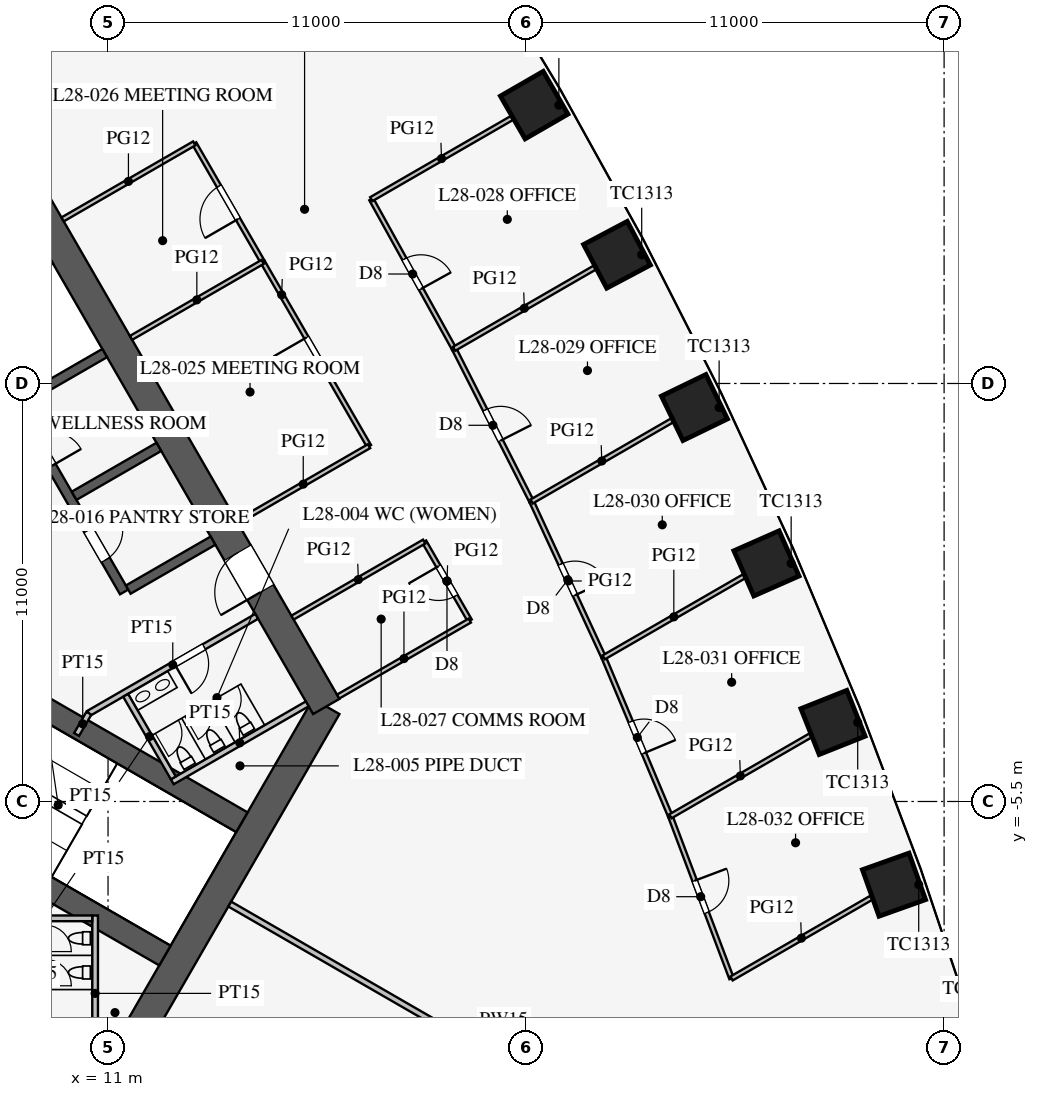
"""IFC4 building model, lengths in metres.
Left out: names, types, materials, properties, quantities, classifications, styles, units other than length and angle.
Written with IfcOpenShell. Run it as: python <this file> out.ifc"""

import sys

from ifc_helpers import new_model, si_unit, direction, frame, frame_2d, origin, origin_2d, place, context, subcontext, project, spatial, rectangle, extrude, element, fill, save


model = new_model("IFC4")
c1 = context("Model", 3, precision=1e-05, world=origin(), true_north=direction((0.0, 1.0)))
c2 = subcontext(c1, "Body", "Model", "MODEL_VIEW")
j1 = project(units=[si_unit("LENGTHUNIT", "METRE"), si_unit("PLANEANGLEUNIT", "RADIAN")], contexts=[c1])
p1 = place(None, origin())
s1 = spatial("IfcSite", under=j1, at=p1, CompositionType="ELEMENT")
p2 = place(p1, origin())
s2 = spatial("IfcBuilding", under=s1, at=p2, CompositionType="ELEMENT")
p3 = place(p2, frame((0.0, 0.0, 124.1)))
s3 = spatial("IfcBuildingStorey", under=s2, at=p3, CompositionType="ELEMENT", Elevation=124.1)
for number, where, z_axis, x_axis in (
    (1, (31.682, -7.689, 0.0), (0.0, 0.0, 1.0), (-0.336, 0.942, 0.0)),
    (2, (30.077, -3.42, 0.0), (0.0, 0.0, 1.0), (-0.37, 0.929, 0.0)),
    (3, (28.325, 0.765, 0.0), (0.0, 0.0, 1.0), (-0.403, 0.915, 0.0)),
    (4, (26.43, 4.867, 0.0), (0.0, 0.0, 1.0), (-0.436, 0.9, 0.0)),
    (5, (24.393, 8.887, 0.0), (0.0, 0.0, 1.0), (-0.468, 0.883, 0.0)),
    (6, (22.213, 12.825, 0.0), (0.0, 0.0, 1.0), (-0.5, 0.866, 0.0)),
):
    element("IfcColumn", number, at=place(p3, frame(where, z_axis=z_axis, x_axis=x_axis)), inside=s3, PredefinedType="COLUMN", context=c2, shape_type="SweptSolid", body=[
        extrude(rectangle(XDim=1.3, YDim=1.3, at=origin_2d()), origin(), (0.0, 0.0, 1.0), 4.2),
    ])
p4 = place(p3, frame((10.97, -13.0, 0.0), z_axis=(0.0, 0.0, 1.0), x_axis=(0.499995765644, 0.866027848477, 0.0)))
e7 = element("IfcWall", 7, at=p4, inside=s3, PredefinedType="SHEAR", context=c2, shape_type="SweptSolid", body=[
    extrude(rectangle(XDim=11.547, YDim=0.8, at=frame_2d((5.773, 0.0))), origin(), (0.0, 0.0, 1.0), 4.2),
])
p5 = place(p3, frame((16.743, -3.0, 0.0), z_axis=(0.0, 0.0, 1.0), x_axis=(-0.500002442456, 0.866023993627, 0.0)))
e8 = element("IfcWall", 8, at=p5, inside=s3, PredefinedType="SHEAR", context=c2, shape_type="SweptSolid", body=[
    extrude(rectangle(XDim=21.939, YDim=0.8, at=frame_2d((10.97, 0.0))), origin(), (0.0, 0.0, 1.0), 4.2),
])
p6 = place(p5, frame((17.27, 0.0, 0.0)))
e9 = element("IfcOpeningElement", 9, at=p6, cuts=e8, PredefinedType="OPENING", context=c2, shape_type="SweptSolid", body=[
    extrude(rectangle(XDim=1.2, YDim=2.1, at=frame_2d((0.6, 1.05))), frame((0.0, 0.41, 0.0), z_axis=(0.0, -1.0, 0.0), x_axis=(1.0, 0.0, 0.0)), (0.0, 0.0, 1.0), 0.82),
])
p7 = place(p5, frame((3.47, 0.0, 0.0)))
e10 = element("IfcOpeningElement", 10, at=p7, cuts=e8, PredefinedType="OPENING", context=c2, shape_type="SweptSolid", body=[
    extrude(rectangle(XDim=1.2, YDim=2.1, at=frame_2d((0.6, 1.05))), frame((0.0, 0.41, 0.0), z_axis=(0.0, -1.0, 0.0), x_axis=(1.0, 0.0, 0.0)), (0.0, 0.0, 1.0), 0.82),
])
p8 = place(p3, frame((11.424, 0.014, 0.0), z_axis=(0.0, 0.0, 1.0), x_axis=(-0.500001763848, 0.866024385424, 0.0)))
e11 = element("IfcWall", 11, at=p8, inside=s3, PredefinedType="SHEAR", context=c2, shape_type="SweptSolid", body=[
    extrude(rectangle(XDim=11.4, YDim=0.25, at=frame_2d((5.7, 0.0))), origin(), (0.0, 0.0, 1.0), 4.2),
])
p9 = place(p8, frame((0.975, 0.0, 0.0)))
e12 = element("IfcOpeningElement", 12, at=p9, cuts=e11, PredefinedType="OPENING", context=c2, shape_type="SweptSolid", body=[
    extrude(rectangle(XDim=0.9, YDim=2.1, at=frame_2d((0.45, 1.05))), frame((0.0, 0.135, 0.0), z_axis=(0.0, -1.0, 0.0), x_axis=(1.0, 0.0, 0.0)), (0.0, 0.0, 1.0), 0.27),
])
p10 = place(p8, frame((3.825, 0.0, 0.0)))
e13 = element("IfcOpeningElement", 13, at=p10, cuts=e11, PredefinedType="OPENING", context=c2, shape_type="SweptSolid", body=[
    extrude(rectangle(XDim=0.9, YDim=2.1, at=frame_2d((0.45, 1.05))), frame((0.0, 0.135, 0.0), z_axis=(0.0, -1.0, 0.0), x_axis=(1.0, 0.0, 0.0)), (0.0, 0.0, 1.0), 0.27),
])
for number, where, z_axis, x_axis in (
    (14, (11.532, 0.076, 0.0), (0.0, 0.0, 1.0), (0.866, 0.5, 0.0)),
    (15, (10.107, 2.544, 0.0), (0.0, 0.0, 1.0), (0.866, 0.5, 0.0)),
    (16, (8.682, 5.012, 0.0), (0.0, 0.0, 1.0), (0.866, 0.5, 0.0)),
    (17, (7.257, 7.481, 0.0), (0.0, 0.0, 1.0), (0.866, 0.5, 0.0)),
):
    element("IfcWall", number, at=place(p3, frame(where, z_axis=z_axis, x_axis=x_axis)), inside=s3, PredefinedType="SHEAR", context=c2, shape_type="SweptSolid", body=[
        extrude(rectangle(XDim=2.575, YDim=0.25, at=frame_2d((1.288, 0.0))), origin(), (0.0, 0.0, 1.0), 4.2),
    ])
for number, where, z_axis, x_axis in (
    (18, (4.638, -5.016, 0.0), (0.0, 0.0, 1.0), (0.866, -0.5, 0.0)),
    (19, (6.663, -1.509, 0.0), (0.0, 0.0, 1.0), (0.866, -0.5, 0.0)),
):
    element("IfcWall", number, at=place(p3, frame(where, z_axis=z_axis, x_axis=x_axis)), inside=s3, PredefinedType="SHEAR", context=c2, shape_type="SweptSolid", body=[
        extrude(rectangle(XDim=9.075, YDim=0.6, at=frame_2d((4.538, 0.0))), origin(), (0.0, 0.0, 1.0), 4.2),
    ])
p11 = place(p3, frame((10.495, -3.178, 0.0), z_axis=(0.0, 0.0, 1.0), x_axis=(0.86602216432, 0.500005610874, 0.0)))
e20 = element("IfcWall", 20, at=p11, inside=s3, PredefinedType="PARTITIONING", context=c2, shape_type="SweptSolid", body=[
    extrude(rectangle(XDim=5.1, YDim=0.15, at=frame_2d((2.55, 0.0))), origin(), (0.0, 0.0, 1.0), 4.0),
])
p12 = place(p11, frame((2.6, 0.0, 0.0)))
e21 = element("IfcOpeningElement", 21, at=p12, cuts=e20, PredefinedType="OPENING", context=c2, shape_type="SweptSolid", body=[
    extrude(rectangle(XDim=0.9, YDim=2.1, at=frame_2d((0.45, 1.05))), frame((0.0, 0.085, 0.0), z_axis=(0.0, -1.0, 0.0), x_axis=(1.0, 0.0, 0.0)), (0.0, 0.0, 1.0), 0.17),
])
p13 = place(p3, frame((10.495, -3.178, 0.0), z_axis=(0.0, 0.0, 1.0), x_axis=(-0.499842556608, -0.866116284689, 0.0)))
e22 = element("IfcWall", 22, at=p13, inside=s3, PredefinedType="PARTITIONING", context=c2, shape_type="SweptSolid", body=[
    extrude(rectangle(XDim=0.645, YDim=0.15, at=frame_2d((0.323, 0.0))), origin(), (0.0, 0.0, 1.0), 4.0),
])
p14 = place(p3, frame((10.66, -8.5, 0.0), z_axis=(0.0, 0.0, 1.0), x_axis=(0.0, -1.0, 0.0)))
e23 = element("IfcWall", 23, at=p14, inside=s3, PredefinedType="PARTITIONING", context=c2, shape_type="SweptSolid", body=[
    extrude(rectangle(XDim=4.1, YDim=0.15, at=frame_2d((2.05, 0.0))), origin(), (0.0, 0.0, 1.0), 4.0),
])
p15 = place(p3, frame((8.075, -8.575, 0.0), z_axis=(0.0, 0.0, 1.0), x_axis=(1.0, 0.0, 0.0)))
e24 = element("IfcWall", 24, at=p15, inside=s3, PredefinedType="PARTITIONING", context=c2, shape_type="SweptSolid", body=[
    extrude(rectangle(XDim=2.51, YDim=0.15, at=frame_2d((1.255, 0.0))), origin(), (0.0, 0.0, 1.0), 4.0),
])
p16 = place(p3, frame((12.691, -4.982, 0.0), z_axis=(0.0, 0.0, 1.0), x_axis=(0.8660249478, 0.500000789788, 0.0)))
e25 = element("IfcWall", 25, at=p16, inside=s3, PredefinedType="PARTITIONING", context=c2, shape_type="SweptSolid", body=[
    extrude(rectangle(XDim=4.1, YDim=0.15, at=frame_2d((2.05, 0.0))), origin(), (0.0, 0.0, 1.0), 4.0),
])
p17 = place(p3, frame((11.464, -2.706, 0.0), z_axis=(0.0, 0.0, 1.0), x_axis=(0.50001992892, -0.866013897511, 0.0)))
e26 = element("IfcWall", 26, at=p17, inside=s3, PredefinedType="PARTITIONING", context=c2, shape_type="SweptSolid", body=[
    extrude(rectangle(XDim=2.51, YDim=0.15, at=frame_2d((1.255, 0.0))), origin(), (0.0, 0.0, 1.0), 4.0),
])
p18 = place(p3, frame((14.203, -8.2, 0.0), z_axis=(0.0, 0.0, 1.0), x_axis=(0.866024668836, -0.500001272966, 0.0)))
e27 = element("IfcWall", 27, at=p18, inside=s3, PredefinedType="PARTITIONING", context=c2, shape_type="SweptSolid", body=[
    extrude(rectangle(XDim=16.65, YDim=0.15, at=frame_2d((8.325, 0.0))), origin(), (0.0, 0.0, 1.0), 2.3),
])
p19 = place(p3, frame((15.069, 8.7, 0.0), z_axis=(0.0, 0.0, 1.0), x_axis=(-0.500012057535, 0.866018442252, 0.0)))
e28 = element("IfcWall", 28, at=p19, inside=s3, PredefinedType="PARTITIONING", context=c2, shape_type="SweptSolid", body=[
    extrude(rectangle(XDim=3.6, YDim=0.12, at=frame_2d((1.8, 0.0))), origin(), (0.0, 0.0, 1.0), 2.9),
])
p20 = place(p19, frame((1.3, 0.0, 0.15)))
e29 = element("IfcOpeningElement", 29, at=p20, cuts=e28, PredefinedType="OPENING", context=c2, shape_type="SweptSolid", body=[
    extrude(rectangle(XDim=1.0, YDim=2.1, at=frame_2d((0.5, 1.05))), frame((0.0, 0.07, 0.0), z_axis=(0.0, -1.0, 0.0), x_axis=(1.0, 0.0, 0.0)), (0.0, 0.0, 1.0), 0.14),
])
p21 = place(p3, frame((20.519, -0.74, 0.0), z_axis=(0.0, 0.0, 1.0), x_axis=(-0.499957262057, 0.866050077142, 0.0)))
e30 = element("IfcWall", 30, at=p21, inside=s3, PredefinedType="PARTITIONING", context=c2, shape_type="SweptSolid", body=[
    extrude(rectangle(XDim=2.4, YDim=0.12, at=frame_2d((1.2, 0.0))), origin(), (0.0, 0.0, 1.0), 2.9),
])
p22 = place(p21, frame((0.75, 0.0, 0.15)))
e31 = element("IfcOpeningElement", 31, at=p22, cuts=e30, PredefinedType="OPENING", context=c2, shape_type="SweptSolid", body=[
    extrude(rectangle(XDim=0.9, YDim=2.1, at=frame_2d((0.45, 1.05))), frame((0.0, 0.07, 0.0), z_axis=(0.0, -1.0, 0.0), x_axis=(1.0, 0.0, 0.0)), (0.0, 0.0, 1.0), 0.14),
])
p23 = place(p3, frame((17.869, 3.85, 0.0), z_axis=(0.0, 0.0, 1.0), x_axis=(-0.500016814911, 0.866015695474, 0.0)))
e32 = element("IfcWall", 32, at=p23, inside=s3, PredefinedType="PARTITIONING", context=c2, shape_type="SweptSolid", body=[
    extrude(rectangle(XDim=5.6, YDim=0.12, at=frame_2d((2.8, 0.0))), origin(), (0.0, 0.0, 1.0), 2.9),
])
p24 = place(p23, frame((2.3, 0.0, 0.15)))
e33 = element("IfcOpeningElement", 33, at=p24, cuts=e32, PredefinedType="OPENING", context=c2, shape_type="SweptSolid", body=[
    extrude(rectangle(XDim=1.0, YDim=2.1, at=frame_2d((0.5, 1.05))), frame((0.0, 0.07, 0.0), z_axis=(0.0, -1.0, 0.0), x_axis=(1.0, 0.0, 0.0)), (0.0, 0.0, 1.0), 0.14),
])
for number, where, z_axis, x_axis in (
    (34, (9.805, 9.818, 0.0), (0.0, 0.0, 1.0), (0.866, 0.5, 0.0)),
    (35, (11.605, 6.7, 0.0), (0.0, 0.0, 1.0), (0.866, 0.5, 0.0)),
    (36, (17.055, -2.74, 0.0), (0.0, 0.0, 1.0), (0.866, 0.5, 0.0)),
    (37, (14.405, 1.85, 0.0), (0.0, 0.0, 1.0), (0.866, 0.5, 0.0)),
    (38, (15.855, -0.661, 0.0), (0.0, 0.0, 1.0), (0.866, 0.5, 0.0)),
):
    element("IfcWall", number, at=place(p3, frame(where, z_axis=z_axis, x_axis=x_axis)), inside=s3, PredefinedType="PARTITIONING", context=c2, shape_type="SweptSolid", body=[
        extrude(rectangle(XDim=4.0, YDim=0.12, at=frame_2d((2.0, 0.0))), origin(), (0.0, 0.0, 1.0), 2.9),
    ])
p25 = place(p3, frame((24.043, -1.708, 0.0), z_axis=(0.0, 0.0, 1.0), x_axis=(-0.41992827805, 0.90755729367, 0.0)))
e39 = element("IfcWall", 39, at=p25, inside=s3, PredefinedType="PARTITIONING", context=c2, shape_type="SweptSolid", body=[
    extrude(rectangle(XDim=4.519, YDim=0.12, at=frame_2d((2.259, 0.0))), origin(), (0.0, 0.0, 1.0), 2.9),
])
p26 = place(p25, frame((1.8, 0.0, 0.15)))
e40 = element("IfcOpeningElement", 40, at=p26, cuts=e39, PredefinedType="OPENING", context=c2, shape_type="SweptSolid", body=[
    extrude(rectangle(XDim=0.9, YDim=2.1, at=frame_2d((0.45, 1.05))), frame((0.0, 0.07, 0.0), z_axis=(0.0, -1.0, 0.0), x_axis=(1.0, 0.0, 0.0)), (0.0, 0.0, 1.0), 0.14),
])
p27 = place(p3, frame((25.797, -5.891, 0.0), z_axis=(0.0, 0.0, 1.0), x_axis=(-0.386762112496, 0.922179520667, 0.0)))
e41 = element("IfcWall", 41, at=p27, inside=s3, PredefinedType="PARTITIONING", context=c2, shape_type="SweptSolid", body=[
    extrude(rectangle(XDim=4.536, YDim=0.12, at=frame_2d((2.268, 0.0))), origin(), (0.0, 0.0, 1.0), 2.9),
])
p28 = place(p27, frame((1.8, 0.0, 0.15)))
e42 = element("IfcOpeningElement", 42, at=p28, cuts=e41, PredefinedType="OPENING", context=c2, shape_type="SweptSolid", body=[
    extrude(rectangle(XDim=0.9, YDim=2.1, at=frame_2d((0.45, 1.05))), frame((0.0, 0.07, 0.0), z_axis=(0.0, -1.0, 0.0), x_axis=(1.0, 0.0, 0.0)), (0.0, 0.0, 1.0), 0.14),
])
p29 = place(p3, frame((27.406, -10.158, 0.0), z_axis=(0.0, 0.0, 1.0), x_axis=(-0.352894560512, 0.93566309597, 0.0)))
e43 = element("IfcWall", 43, at=p29, inside=s3, PredefinedType="PARTITIONING", context=c2, shape_type="SweptSolid", body=[
    extrude(rectangle(XDim=4.561, YDim=0.12, at=frame_2d((2.28, 0.0))), origin(), (0.0, 0.0, 1.0), 2.9),
])
p30 = place(p29, frame((1.85, 0.0, 0.15)))
e44 = element("IfcOpeningElement", 44, at=p30, cuts=e43, PredefinedType="OPENING", context=c2, shape_type="SweptSolid", body=[
    extrude(rectangle(XDim=0.9, YDim=2.1, at=frame_2d((0.45, 1.05))), frame((0.0, 0.07, 0.0), z_axis=(0.0, -1.0, 0.0), x_axis=(1.0, 0.0, 0.0)), (0.0, 0.0, 1.0), 0.14),
])
p31 = place(p3, frame((20.106, 6.412, 0.0), z_axis=(0.0, 0.0, 1.0), x_axis=(-0.484292898211, 0.874905931368, 0.0)))
e45 = element("IfcWall", 45, at=p31, inside=s3, PredefinedType="PARTITIONING", context=c2, shape_type="SweptSolid", body=[
    extrude(rectangle(XDim=4.501, YDim=0.12, at=frame_2d((2.25, 0.0))), origin(), (0.0, 0.0, 1.0), 2.9),
])
p32 = place(p31, frame((1.8, 0.0, 0.15)))
e46 = element("IfcOpeningElement", 46, at=p32, cuts=e45, PredefinedType="OPENING", context=c2, shape_type="SweptSolid", body=[
    extrude(rectangle(XDim=0.9, YDim=2.1, at=frame_2d((0.45, 1.05))), frame((0.0, 0.07, 0.0), z_axis=(0.0, -1.0, 0.0), x_axis=(1.0, 0.0, 0.0)), (0.0, 0.0, 1.0), 0.14),
])
p33 = place(p3, frame((22.145, 2.393, 0.0), z_axis=(0.0, 0.0, 1.0), x_axis=(-0.452471679136, 0.891778772779, 0.0)))
e47 = element("IfcWall", 47, at=p33, inside=s3, PredefinedType="PARTITIONING", context=c2, shape_type="SweptSolid", body=[
    extrude(rectangle(XDim=4.507, YDim=0.12, at=frame_2d((2.253, 0.0))), origin(), (0.0, 0.0, 1.0), 2.9),
])
p34 = place(p33, frame((1.8, 0.0, 0.15)))
e48 = element("IfcOpeningElement", 48, at=p34, cuts=e47, PredefinedType="OPENING", context=c2, shape_type="SweptSolid", body=[
    extrude(rectangle(XDim=0.9, YDim=2.1, at=frame_2d((0.45, 1.05))), frame((0.0, 0.07, 0.0), z_axis=(0.0, -1.0, 0.0), x_axis=(1.0, 0.0, 0.0)), (0.0, 0.0, 1.0), 0.14),
])
p35 = place(p3, frame((17.927, 10.35, 0.0), z_axis=(0.0, 0.0, 1.0), x_axis=(0.866014192265, 0.500019418418, 0.0)))
e49 = element("IfcWall", 49, at=p35, inside=s3, PredefinedType="PARTITIONING", context=c2, shape_type="SweptSolid", body=[
    extrude(rectangle(XDim=4.27, YDim=0.12, at=frame_2d((2.135, 0.0))), origin(), (0.0, 0.0, 1.0), 2.9),
])
p36 = place(p3, frame((24.043, -1.708, 0.0), z_axis=(0.0, 0.0, 1.0), x_axis=(0.866006218662, 0.500033228135, 0.0)))
e50 = element("IfcWall", 50, at=p36, inside=s3, PredefinedType="PARTITIONING", context=c2, shape_type="SweptSolid", body=[
    extrude(rectangle(XDim=4.261, YDim=0.12, at=frame_2d((2.131, 0.0))), origin(), (0.0, 0.0, 1.0), 2.9),
])
p37 = place(p3, frame((25.797, -5.891, 0.0), z_axis=(0.0, 0.0, 1.0), x_axis=(0.866020257797, 0.500008913007, 0.0)))
e51 = element("IfcWall", 51, at=p37, inside=s3, PredefinedType="PARTITIONING", context=c2, shape_type="SweptSolid", body=[
    extrude(rectangle(XDim=4.254, YDim=0.12, at=frame_2d((2.127, 0.0))), origin(), (0.0, 0.0, 1.0), 2.9),
])
p38 = place(p3, frame((27.406, -10.158, 0.0), z_axis=(0.0, 0.0, 1.0), x_axis=(0.866022790583, 0.50000452617, 0.0)))
e52 = element("IfcWall", 52, at=p38, inside=s3, PredefinedType="PARTITIONING", context=c2, shape_type="SweptSolid", body=[
    extrude(rectangle(XDim=4.246, YDim=0.12, at=frame_2d((2.123, 0.0))), origin(), (0.0, 0.0, 1.0), 2.9),
])
p39 = place(p3, frame((20.106, 6.412, 0.0), z_axis=(0.0, 0.0, 1.0), x_axis=(0.866020825576, 0.500007929605, 0.0)))
e53 = element("IfcWall", 53, at=p39, inside=s3, PredefinedType="PARTITIONING", context=c2, shape_type="SweptSolid", body=[
    extrude(rectangle(XDim=4.269, YDim=0.12, at=frame_2d((2.135, 0.0))), origin(), (0.0, 0.0, 1.0), 2.9),
])
p40 = place(p3, frame((22.145, 2.393, 0.0), z_axis=(0.0, 0.0, 1.0), x_axis=(0.86602643523, 0.49999821348, 0.0)))
e54 = element("IfcWall", 54, at=p40, inside=s3, PredefinedType="PARTITIONING", context=c2, shape_type="SweptSolid", body=[
    extrude(rectangle(XDim=4.266, YDim=0.12, at=frame_2d((2.133, 0.0))), origin(), (0.0, 0.0, 1.0), 2.9),
])
p41 = place(p12, frame((0.9, 0.0, 0.0), z_axis=(0.0, 0.0, 1.0), x_axis=(-1.0, 0.0, 0.0)))
e55 = element("IfcDoor", 55, at=p41, inside=s3, OperationType="SINGLE_SWING_RIGHT", PredefinedType="DOOR", context=c2, shape_type="SweptSolid", body=[
    extrude(rectangle(XDim=0.9, YDim=2.1, at=frame_2d((0.45, 1.05))), frame((0.0, 0.025, 0.0), z_axis=(0.0, -1.0, 0.0), x_axis=(1.0, 0.0, 0.0)), (0.0, 0.0, 1.0), 0.05),
])
fill(e21, e55)
p42 = place(p7, origin())
e56 = element("IfcDoor", 56, at=p42, inside=s3, OperationType="SINGLE_SWING_LEFT", PredefinedType="DOOR", context=c2, shape_type="SweptSolid", body=[
    extrude(rectangle(XDim=1.2, YDim=2.1, at=frame_2d((0.6, 1.05))), frame((0.0, 0.025, 0.0), z_axis=(0.0, -1.0, 0.0), x_axis=(1.0, 0.0, 0.0)), (0.0, 0.0, 1.0), 0.05),
])
fill(e10, e56)
p43 = place(p9, frame((0.9, 0.0, 0.0), z_axis=(0.0, 0.0, 1.0), x_axis=(-1.0, 0.0, 0.0)))
e57 = element("IfcDoor", 57, at=p43, inside=s3, OperationType="SINGLE_SWING_LEFT", PredefinedType="DOOR", context=c2, shape_type="SweptSolid", body=[
    extrude(rectangle(XDim=0.9, YDim=2.1, at=frame_2d((0.45, 1.05))), frame((0.0, 0.025, 0.0), z_axis=(0.0, -1.0, 0.0), x_axis=(1.0, 0.0, 0.0)), (0.0, 0.0, 1.0), 0.05),
])
fill(e12, e57)
p44 = place(p24, origin())
e58 = element("IfcDoor", 58, at=p44, inside=s3, OperationType="SINGLE_SWING_RIGHT", PredefinedType="DOOR", context=c2, shape_type="SweptSolid", body=[
    extrude(rectangle(XDim=1.0, YDim=2.1, at=frame_2d((0.5, 1.05))), frame((0.0, 0.025, 0.0), z_axis=(0.0, -1.0, 0.0), x_axis=(1.0, 0.0, 0.0)), (0.0, 0.0, 1.0), 0.05),
])
fill(e33, e58)
p45 = place(p20, origin())
e59 = element("IfcDoor", 59, at=p45, inside=s3, OperationType="SINGLE_SWING_LEFT", PredefinedType="DOOR", context=c2, shape_type="SweptSolid", body=[
    extrude(rectangle(XDim=1.0, YDim=2.1, at=frame_2d((0.5, 1.05))), frame((0.0, 0.025, 0.0), z_axis=(0.0, -1.0, 0.0), x_axis=(1.0, 0.0, 0.0)), (0.0, 0.0, 1.0), 0.05),
])
fill(e29, e59)
p46 = place(p22, origin())
e60 = element("IfcDoor", 60, at=p46, inside=s3, OperationType="SINGLE_SWING_RIGHT", PredefinedType="DOOR", context=c2, shape_type="SweptSolid", body=[
    extrude(rectangle(XDim=0.9, YDim=2.1, at=frame_2d((0.45, 1.05))), frame((0.0, 0.025, 0.0), z_axis=(0.0, -1.0, 0.0), x_axis=(1.0, 0.0, 0.0)), (0.0, 0.0, 1.0), 0.05),
])
fill(e31, e60)
p47 = place(p32, frame((0.9, 0.0, 0.0), z_axis=(0.0, 0.0, 1.0), x_axis=(-1.0, 0.0, 0.0)))
e61 = element("IfcDoor", 61, at=p47, inside=s3, OperationType="SINGLE_SWING_RIGHT", PredefinedType="DOOR", context=c2, shape_type="SweptSolid", body=[
    extrude(rectangle(XDim=0.9, YDim=2.1, at=frame_2d((0.45, 1.05))), frame((0.0, 0.025, 0.0), z_axis=(0.0, -1.0, 0.0), x_axis=(1.0, 0.0, 0.0)), (0.0, 0.0, 1.0), 0.05),
])
fill(e46, e61)
p48 = place(p34, frame((0.9, 0.0, 0.0), z_axis=(0.0, 0.0, 1.0), x_axis=(-1.0, 0.0, 0.0)))
e62 = element("IfcDoor", 62, at=p48, inside=s3, OperationType="SINGLE_SWING_RIGHT", PredefinedType="DOOR", context=c2, shape_type="SweptSolid", body=[
    extrude(rectangle(XDim=0.9, YDim=2.1, at=frame_2d((0.45, 1.05))), frame((0.0, 0.025, 0.0), z_axis=(0.0, -1.0, 0.0), x_axis=(1.0, 0.0, 0.0)), (0.0, 0.0, 1.0), 0.05),
])
fill(e48, e62)
p49 = place(p26, frame((0.9, 0.0, 0.0), z_axis=(0.0, 0.0, 1.0), x_axis=(-1.0, 0.0, 0.0)))
e63 = element("IfcDoor", 63, at=p49, inside=s3, OperationType="SINGLE_SWING_RIGHT", PredefinedType="DOOR", context=c2, shape_type="SweptSolid", body=[
    extrude(rectangle(XDim=0.9, YDim=2.1, at=frame_2d((0.45, 1.05))), frame((0.0, 0.025, 0.0), z_axis=(0.0, -1.0, 0.0), x_axis=(1.0, 0.0, 0.0)), (0.0, 0.0, 1.0), 0.05),
])
fill(e40, e63)
p50 = place(p28, frame((0.9, 0.0, 0.0), z_axis=(0.0, 0.0, 1.0), x_axis=(-1.0, 0.0, 0.0)))
e64 = element("IfcDoor", 64, at=p50, inside=s3, OperationType="SINGLE_SWING_RIGHT", PredefinedType="DOOR", context=c2, shape_type="SweptSolid", body=[
    extrude(rectangle(XDim=0.9, YDim=2.1, at=frame_2d((0.45, 1.05))), frame((0.0, 0.025, 0.0), z_axis=(0.0, -1.0, 0.0), x_axis=(1.0, 0.0, 0.0)), (0.0, 0.0, 1.0), 0.05),
])
fill(e42, e64)
p51 = place(p30, frame((0.9, 0.0, 0.0), z_axis=(0.0, 0.0, 1.0), x_axis=(-1.0, 0.0, 0.0)))
e65 = element("IfcDoor", 65, at=p51, inside=s3, OperationType="SINGLE_SWING_LEFT", PredefinedType="DOOR", context=c2, shape_type="SweptSolid", body=[
    extrude(rectangle(XDim=0.9, YDim=2.1, at=frame_2d((0.45, 1.05))), frame((0.0, 0.025, 0.0), z_axis=(0.0, -1.0, 0.0), x_axis=(1.0, 0.0, 0.0)), (0.0, 0.0, 1.0), 0.05),
])
fill(e44, e65)
save(model, sys.argv[1])
